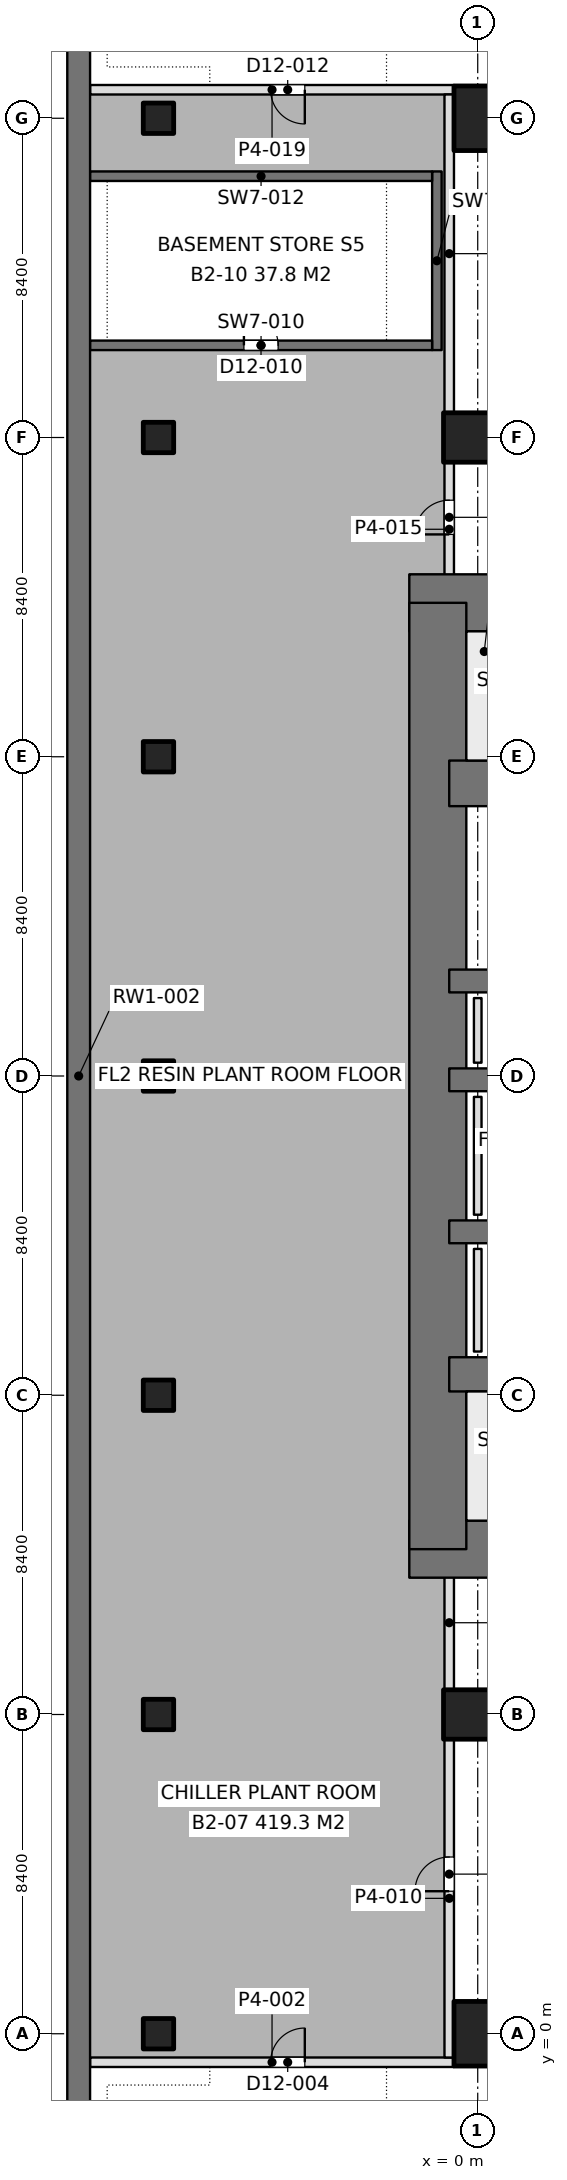
"""IFC4 building model, lengths in metres.
Left out: names, types, materials, properties, quantities, classifications, styles, units other than length and angle.
Written with IfcOpenShell. Run it as: python <this file> out.ifc"""

import sys

from ifc_helpers import new_model, si_unit, direction, frame, frame_2d, origin, origin_with_axes, origin_2d, place, context, subcontext, project, spatial, rectangle, extrude, element, fill, save


model = new_model("IFC4")
c1 = context("Model", 3, precision=1e-05, world=origin(), true_north=direction((0.0, 1.0)))
c2 = subcontext(c1, "Body", "Model", "MODEL_VIEW")
j1 = project(units=[si_unit("LENGTHUNIT", "METRE"), si_unit("PLANEANGLEUNIT", "RADIAN")], contexts=[c1])
p1 = place(None, origin())
s1 = spatial("IfcSite", under=j1, at=p1, CompositionType="ELEMENT")
p2 = place(p1, origin())
s2 = spatial("IfcBuilding", under=s1, at=p2, CompositionType="ELEMENT")
p3 = place(p2, frame((0.0, 0.0, -8.4)))
s3 = spatial("IfcBuildingStorey", under=s2, at=p3, CompositionType="ELEMENT", Elevation=-8.4)
p4 = place(p3, frame((-10.5, -10.5, 0.0), z_axis=(0.0, 0.0, 1.0), x_axis=(0.0, 1.0, 0.0)))
e1 = element("IfcWall", 1, at=p4, inside=s3, PredefinedType="SOLIDWALL", context=c2, shape_type="SweptSolid", body=[
    extrude(rectangle(XDim=71.4, YDim=0.6, at=frame_2d((35.7, 0.0))), origin(), (0.0, 0.0, 1.0), 4.2),
])
for number, where, z_axis, x_axis in (
    (2, (-8.4, 0.0, 0.0), (0.0, 0.0, 1.0), (1.0, 0.0, 0.0)),
    (3, (-8.4, 8.4, 0.0), (0.0, 0.0, 1.0), (1.0, 0.0, 0.0)),
    (4, (-8.4, 16.8, 0.0), (0.0, 0.0, 1.0), (1.0, 0.0, 0.0)),
    (5, (-8.4, 25.2, 0.0), (0.0, 0.0, 1.0), (1.0, 0.0, 0.0)),
    (6, (-8.4, 33.6, 0.0), (0.0, 0.0, 1.0), (1.0, 0.0, 0.0)),
    (7, (-8.4, 42.0, 0.0), (0.0, 0.0, 1.0), (1.0, 0.0, 0.0)),
    (8, (-8.4, 50.4, 0.0), (0.0, 0.0, 1.0), (1.0, 0.0, 0.0)),
):
    element("IfcColumn", number, at=place(p3, frame(where, z_axis=z_axis, x_axis=x_axis)), inside=s3, PredefinedType="COLUMN", context=c2, shape_type="SweptSolid", body=[
        extrude(rectangle(XDim=0.8, YDim=0.8, at=origin_2d()), origin(), (0.0, 0.0, 1.0), 4.2),
    ])
p5 = place(p3, origin_with_axes())
e9 = element("IfcColumn", 9, at=p5, inside=s3, PredefinedType="COLUMN", context=c2, shape_type="SweptSolid", body=[
    extrude(rectangle(XDim=1.25, YDim=1.7, at=origin_2d()), origin(), (0.0, 0.0, 1.0), 4.2),
])
for number, where, z_axis, x_axis in (
    (10, (0.0, 8.4, 0.0), (0.0, 0.0, 1.0), (0.0, 1.0, 0.0)),
    (11, (0.0, 42.0, 0.0), (0.0, 0.0, 1.0), (0.0, 1.0, 0.0)),
):
    element("IfcColumn", number, at=place(p3, frame(where, z_axis=z_axis, x_axis=x_axis)), inside=s3, PredefinedType="COLUMN", context=c2, shape_type="SweptSolid", body=[
        extrude(rectangle(XDim=1.3, YDim=1.8, at=origin_2d()), origin(), (0.0, 0.0, 1.0), 4.2),
    ])
p6 = place(p3, frame((0.0, 50.4, 0.0), z_axis=(0.0, 0.0, 1.0), x_axis=(1.0, 0.0, 0.0)))
e12 = element("IfcColumn", 12, at=p6, inside=s3, PredefinedType="COLUMN", context=c2, shape_type="SweptSolid", body=[
    extrude(rectangle(XDim=1.25, YDim=1.7, at=origin_2d()), origin(), (0.0, 0.0, 1.0), 4.2),
])
p7 = place(p3, frame((-1.8, 12.75, 0.0), z_axis=(0.0, 0.0, 1.0), x_axis=(1.0, 0.0, 0.0)))
e13 = element("IfcWall", 13, at=p7, inside=s3, PredefinedType="SHEAR", context=c2, shape_type="SweptSolid", body=[
    extrude(rectangle(XDim=19.2, YDim=1.5, at=frame_2d((9.6, 0.0))), origin(), (0.0, 0.0, 1.0), 4.2),
])
p8 = place(p7, frame((9.55, 0.0, 0.0)))
e14 = element("IfcOpeningElement", 14, at=p8, cuts=e13, PredefinedType="OPENING", context=c2, shape_type="SweptSolid", body=[
    extrude(rectangle(XDim=1.8, YDim=2.4, at=frame_2d((0.9, 1.2))), frame((0.0, 0.76, 0.0), z_axis=(0.0, -1.0, 0.0), x_axis=(1.0, 0.0, 0.0)), (0.0, 0.0, 1.0), 1.52),
])
p9 = place(p3, frame((-1.8, 37.65, 0.0), z_axis=(0.0, 0.0, 1.0), x_axis=(1.0, 0.0, 0.0)))
e15 = element("IfcWall", 15, at=p9, inside=s3, PredefinedType="SHEAR", context=c2, shape_type="SweptSolid", body=[
    extrude(rectangle(XDim=19.2, YDim=1.5, at=frame_2d((9.6, 0.0))), origin(), (0.0, 0.0, 1.0), 4.2),
])
p10 = place(p9, frame((9.55, 0.0, 0.0)))
e16 = element("IfcOpeningElement", 16, at=p10, cuts=e15, PredefinedType="OPENING", context=c2, shape_type="SweptSolid", body=[
    extrude(rectangle(XDim=1.8, YDim=2.4, at=frame_2d((0.9, 1.2))), frame((0.0, 0.76, 0.0), z_axis=(0.0, -1.0, 0.0), x_axis=(1.0, 0.0, 0.0)), (0.0, 0.0, 1.0), 1.52),
])
p11 = place(p3, frame((-1.05, 12.75, 0.0), z_axis=(0.0, 0.0, 1.0), x_axis=(0.0, 1.0, 0.0)))
e17 = element("IfcWall", 17, at=p11, inside=s3, PredefinedType="SHEAR", context=c2, shape_type="SweptSolid", body=[
    extrude(rectangle(XDim=24.9, YDim=1.5, at=frame_2d((12.45, 0.0))), origin(), (0.0, 0.0, 1.0), 4.2),
])
p12 = place(p3, frame((-0.75, 17.35, 0.0), z_axis=(0.0, 0.0, 1.0), x_axis=(1.0, 0.0, 0.0)))
e18 = element("IfcWall", 18, at=p12, inside=s3, PredefinedType="SHEAR", context=c2, shape_type="SweptSolid", body=[
    extrude(rectangle(XDim=7.65, YDim=0.9, at=frame_2d((3.825, 0.0))), origin(), (0.0, 0.0, 1.0), 4.2),
])
for number, where, z_axis, x_axis in (
    (19, (-0.75, 21.1, 0.0), (0.0, 0.0, 1.0), (1.0, 0.0, 0.0)),
    (20, (-0.75, 25.1, 0.0), (0.0, 0.0, 1.0), (1.0, 0.0, 0.0)),
    (21, (-0.75, 27.7, 0.0), (0.0, 0.0, 1.0), (1.0, 0.0, 0.0)),
):
    element("IfcWall", number, at=place(p3, frame(where, z_axis=z_axis, x_axis=x_axis)), inside=s3, PredefinedType="SHEAR", context=c2, shape_type="SweptSolid", body=[
        extrude(rectangle(XDim=7.65, YDim=0.6, at=frame_2d((3.825, 0.0))), origin(), (0.0, 0.0, 1.0), 4.2),
    ])
p13 = place(p3, frame((-0.75, 32.9, 0.0), z_axis=(0.0, 0.0, 1.0), x_axis=(1.0, 0.0, 0.0)))
e22 = element("IfcWall", 22, at=p13, inside=s3, PredefinedType="SHEAR", context=c2, shape_type="SweptSolid", body=[
    extrude(rectangle(XDim=4.45, YDim=1.2, at=frame_2d((2.225, 0.0))), origin(), (0.0, 0.0, 1.0), 4.2),
])
p14 = place(p3, frame((-10.2, -0.75, 0.0), z_axis=(0.0, 0.0, 1.0), x_axis=(1.0, 0.0, 0.0)))
e23 = element("IfcWall", 23, at=p14, inside=s3, PredefinedType="PARTITIONING", context=c2, shape_type="SweptSolid", body=[
    extrude(rectangle(XDim=9.576, YDim=0.25, at=frame_2d((4.788, 0.0))), origin(), (0.0, 0.0, 1.0), 3.85),
])
p15 = place(p14, frame((4.75, 0.0, 0.0)))
e24 = element("IfcOpeningElement", 24, at=p15, cuts=e23, PredefinedType="OPENING", context=c2, shape_type="SweptSolid", body=[
    extrude(rectangle(XDim=0.9, YDim=2.2, at=frame_2d((0.45, 1.1))), frame((0.0, 0.135, 0.0), z_axis=(0.0, -1.0, 0.0), x_axis=(1.0, 0.0, 0.0)), (0.0, 0.0, 1.0), 0.27),
])
p16 = place(p3, frame((-10.2, 51.15, 0.0), z_axis=(0.0, 0.0, 1.0), x_axis=(1.0, 0.0, 0.0)))
e25 = element("IfcWall", 25, at=p16, inside=s3, PredefinedType="PARTITIONING", context=c2, shape_type="SweptSolid", body=[
    extrude(rectangle(XDim=9.576, YDim=0.25, at=frame_2d((4.788, 0.0))), origin(), (0.0, 0.0, 1.0), 3.85),
])
p17 = place(p16, frame((4.75, 0.0, 0.0)))
e26 = element("IfcOpeningElement", 26, at=p17, cuts=e25, PredefinedType="OPENING", context=c2, shape_type="SweptSolid", body=[
    extrude(rectangle(XDim=0.9, YDim=2.2, at=frame_2d((0.45, 1.1))), frame((0.0, 0.135, 0.0), z_axis=(0.0, -1.0, 0.0), x_axis=(1.0, 0.0, 0.0)), (0.0, 0.0, 1.0), 0.27),
])
p18 = place(p3, frame((-0.75, -0.626, 0.0), z_axis=(0.0, 0.0, 1.0), x_axis=(0.0, 1.0, 0.0)))
e27 = element("IfcWall", 27, at=p18, inside=s3, PredefinedType="PARTITIONING", context=c2, shape_type="SweptSolid", body=[
    extrude(rectangle(XDim=8.377, YDim=0.25, at=frame_2d((4.188, 0.0))), origin(), (0.0, 0.0, 1.0), 3.85),
])
p19 = place(p18, frame((4.376, 0.0, 0.0)))
e28 = element("IfcOpeningElement", 28, at=p19, cuts=e27, PredefinedType="OPENING", context=c2, shape_type="SweptSolid", body=[
    extrude(rectangle(XDim=0.9, YDim=2.2, at=frame_2d((0.45, 1.1))), frame((0.0, 0.135, 0.0), z_axis=(0.0, -1.0, 0.0), x_axis=(1.0, 0.0, 0.0)), (0.0, 0.0, 1.0), 0.27),
])
p20 = place(p3, frame((-0.75, 9.049, 0.0), z_axis=(0.0, 0.0, 1.0), x_axis=(0.0, 1.0, 0.0)))
e29 = element("IfcWall", 29, at=p20, inside=s3, PredefinedType="PARTITIONING", context=c2, shape_type="SweptSolid", body=[
    extrude(rectangle(XDim=3.531, YDim=0.25, at=frame_2d((1.766, 0.0))), origin(), (0.0, 0.0, 1.0), 3.85),
])
p21 = place(p3, frame((-0.75, 37.82, 0.0), z_axis=(0.0, 0.0, 1.0), x_axis=(0.0, 1.0, 0.0)))
e30 = element("IfcWall", 30, at=p21, inside=s3, PredefinedType="PARTITIONING", context=c2, shape_type="SweptSolid", body=[
    extrude(rectangle(XDim=3.531, YDim=0.25, at=frame_2d((1.766, 0.0))), origin(), (0.0, 0.0, 1.0), 3.85),
])
p22 = place(p21, frame((1.63, 0.0, 0.0)))
e31 = element("IfcOpeningElement", 31, at=p22, cuts=e30, PredefinedType="OPENING", context=c2, shape_type="SweptSolid", body=[
    extrude(rectangle(XDim=0.9, YDim=2.2, at=frame_2d((0.45, 1.1))), frame((0.0, 0.135, 0.0), z_axis=(0.0, -1.0, 0.0), x_axis=(1.0, 0.0, 0.0)), (0.0, 0.0, 1.0), 0.27),
])
p23 = place(p3, frame((-0.75, 42.649, 0.0), z_axis=(0.0, 0.0, 1.0), x_axis=(0.0, 1.0, 0.0)))
e32 = element("IfcWall", 32, at=p23, inside=s3, PredefinedType="PARTITIONING", context=c2, shape_type="SweptSolid", body=[
    extrude(rectangle(XDim=8.377, YDim=0.25, at=frame_2d((4.188, 0.0))), origin(), (0.0, 0.0, 1.0), 3.85),
])
p24 = place(p3, frame((0.0, 17.95, 0.0), z_axis=(0.0, 0.0, 1.0), x_axis=(0.0, 1.0, 0.0)))
e33 = element("IfcWall", 33, at=p24, inside=s3, PredefinedType="PLUMBINGWALL", context=c2, shape_type="SweptSolid", body=[
    extrude(rectangle(XDim=2.7, YDim=0.2, at=frame_2d((1.35, 0.0))), origin(), (0.0, 0.0, 1.0), 1.2),
])
p25 = place(p3, frame((0.0, 21.55, 0.0), z_axis=(0.0, 0.0, 1.0), x_axis=(0.0, 1.0, 0.0)))
e34 = element("IfcWall", 34, at=p25, inside=s3, PredefinedType="PLUMBINGWALL", context=c2, shape_type="SweptSolid", body=[
    extrude(rectangle(XDim=3.1, YDim=0.2, at=frame_2d((1.55, 0.0))), origin(), (0.0, 0.0, 1.0), 1.2),
])
p26 = place(p3, frame((0.0, 25.55, 0.0), z_axis=(0.0, 0.0, 1.0), x_axis=(0.0, 1.0, 0.0)))
e35 = element("IfcWall", 35, at=p26, inside=s3, PredefinedType="PLUMBINGWALL", context=c2, shape_type="SweptSolid", body=[
    extrude(rectangle(XDim=1.7, YDim=0.2, at=frame_2d((0.85, 0.0))), origin(), (0.0, 0.0, 1.0), 1.2),
])
p27 = place(p3, frame((-10.202, 44.425, 0.0), z_axis=(0.0, 0.0, 1.0), x_axis=(1.0, 0.0, 0.0)))
e36 = element("IfcWall", 36, at=p27, inside=s3, PredefinedType="SOLIDWALL", context=c2, shape_type="SweptSolid", body=[
    extrude(rectangle(XDim=9.002, YDim=0.25, at=frame_2d((4.501, 0.0))), origin(), (0.0, 0.0, 1.0), 4.2),
])
p28 = place(p27, frame((4.05, 0.0, 0.0)))
e37 = element("IfcOpeningElement", 37, at=p28, cuts=e36, PredefinedType="OPENING", context=c2, shape_type="SweptSolid", body=[
    extrude(rectangle(XDim=0.9, YDim=2.2, at=frame_2d((0.45, 1.1))), frame((0.0, 0.135, 0.0), z_axis=(0.0, -1.0, 0.0), x_axis=(1.0, 0.0, 0.0)), (0.0, 0.0, 1.0), 0.27),
])
p29 = place(p3, frame((-10.202, 48.875, 0.0), z_axis=(0.0, 0.0, 1.0), x_axis=(1.0, 0.0, 0.0)))
e38 = element("IfcWall", 38, at=p29, inside=s3, PredefinedType="SOLIDWALL", context=c2, shape_type="SweptSolid", body=[
    extrude(rectangle(XDim=9.002, YDim=0.25, at=frame_2d((4.501, 0.0))), origin(), (0.0, 0.0, 1.0), 4.2),
])
p30 = place(p3, frame((-1.075, 44.3, 0.0), z_axis=(0.0, 0.0, 1.0), x_axis=(0.0, 1.0, 0.0)))
e39 = element("IfcWall", 39, at=p30, inside=s3, PredefinedType="SOLIDWALL", context=c2, shape_type="SweptSolid", body=[
    extrude(rectangle(XDim=4.7, YDim=0.25, at=frame_2d((2.35, 0.0))), origin(), (0.0, 0.0, 1.0), 4.2),
])
p31 = place(p15, origin())
e40 = element("IfcDoor", 40, at=p31, inside=s3, OperationType="SINGLE_SWING_RIGHT", PredefinedType="DOOR", context=c2, shape_type="SweptSolid", body=[
    extrude(rectangle(XDim=0.9, YDim=2.2, at=frame_2d((0.45, 1.1))), frame((0.0, 0.025, 0.0), z_axis=(0.0, -1.0, 0.0), x_axis=(1.0, 0.0, 0.0)), (0.0, 0.0, 1.0), 0.05),
])
fill(e24, e40)
p32 = place(p17, frame((0.9, 0.0, 0.0), z_axis=(0.0, 0.0, 1.0), x_axis=(-1.0, 0.0, 0.0)))
e41 = element("IfcDoor", 41, at=p32, inside=s3, OperationType="SINGLE_SWING_LEFT", PredefinedType="DOOR", context=c2, shape_type="SweptSolid", body=[
    extrude(rectangle(XDim=0.9, YDim=2.2, at=frame_2d((0.45, 1.1))), frame((0.0, 0.025, 0.0), z_axis=(0.0, -1.0, 0.0), x_axis=(1.0, 0.0, 0.0)), (0.0, 0.0, 1.0), 0.05),
])
fill(e26, e41)
p33 = place(p19, origin())
e42 = element("IfcDoor", 42, at=p33, inside=s3, OperationType="SINGLE_SWING_LEFT", PredefinedType="DOOR", context=c2, shape_type="SweptSolid", body=[
    extrude(rectangle(XDim=0.9, YDim=2.2, at=frame_2d((0.45, 1.1))), frame((0.0, 0.025, 0.0), z_axis=(0.0, -1.0, 0.0), x_axis=(1.0, 0.0, 0.0)), (0.0, 0.0, 1.0), 0.05),
])
fill(e28, e42)
p34 = place(p22, origin())
e43 = element("IfcDoor", 43, at=p34, inside=s3, OperationType="SINGLE_SWING_LEFT", PredefinedType="DOOR", context=c2, shape_type="SweptSolid", body=[
    extrude(rectangle(XDim=0.9, YDim=2.2, at=frame_2d((0.45, 1.1))), frame((0.0, 0.025, 0.0), z_axis=(0.0, -1.0, 0.0), x_axis=(1.0, 0.0, 0.0)), (0.0, 0.0, 1.0), 0.05),
])
fill(e31, e43)
p35 = place(p28, origin())
e44 = element("IfcDoor", 44, at=p35, inside=s3, OperationType="SINGLE_SWING_LEFT", PredefinedType="DOOR", context=c2, shape_type="SweptSolid", body=[
    extrude(rectangle(XDim=0.9, YDim=2.2, at=frame_2d((0.45, 1.1))), frame((0.0, 0.025, 0.0), z_axis=(0.0, -1.0, 0.0), x_axis=(1.0, 0.0, 0.0)), (0.0, 0.0, 1.0), 0.05),
])
fill(e37, e44)
save(model, sys.argv[1])
